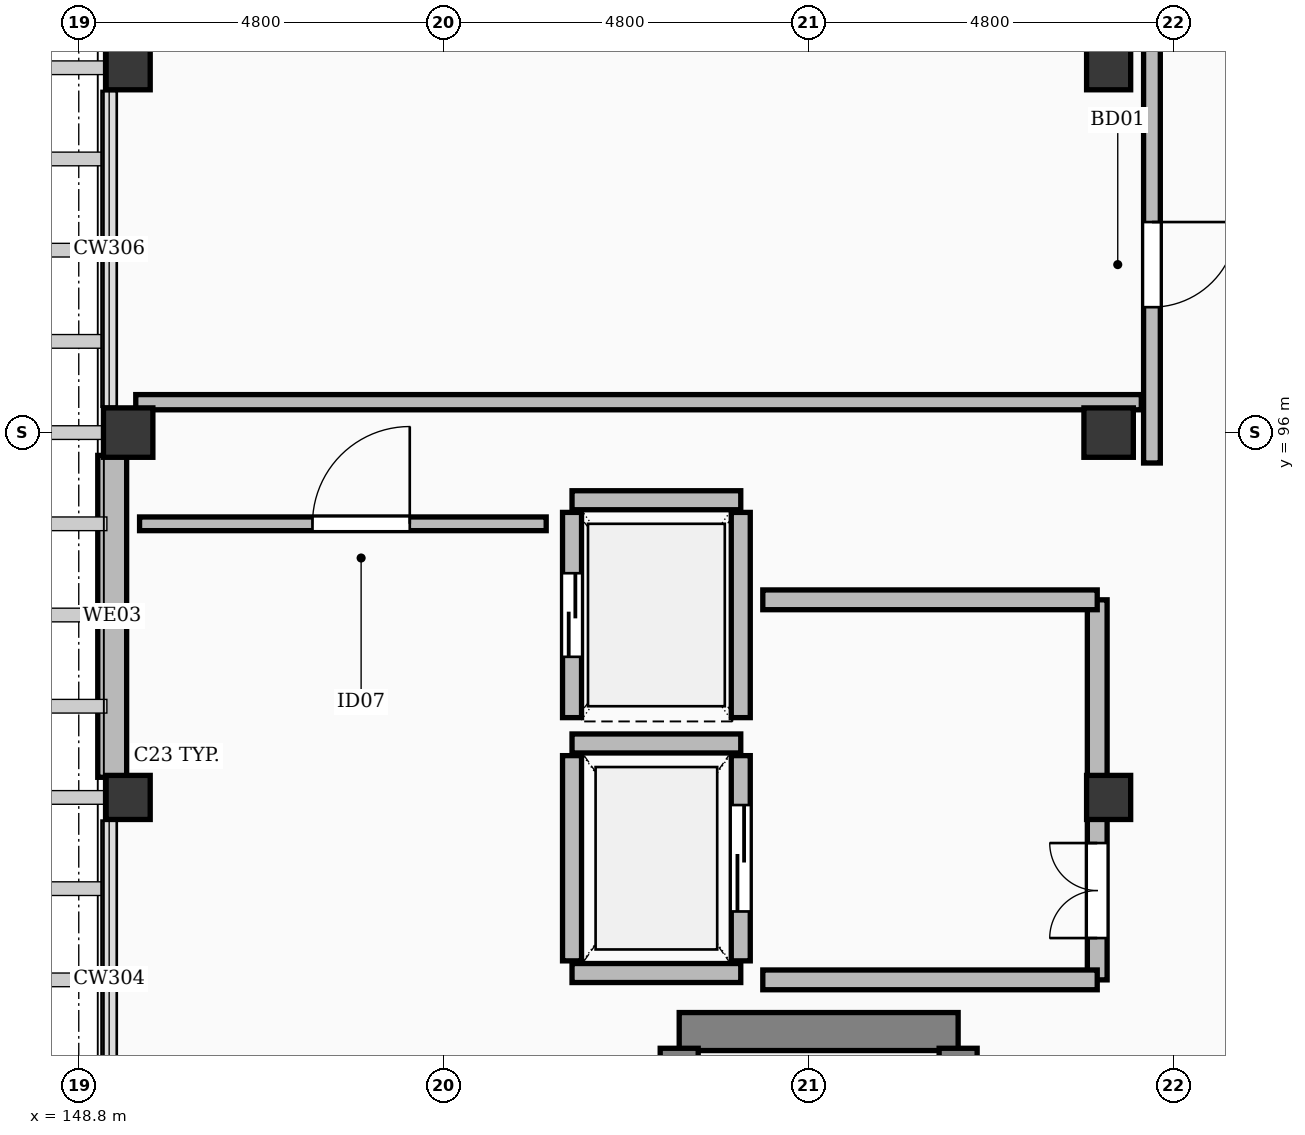
"""IFC4 building model, lengths in metres.
Left out: names, types, materials, properties, quantities, classifications, styles, units other than length and angle.
Written with IfcOpenShell. Run it as: python <this file> out.ifc"""

import sys

from ifc_helpers import new_model, si_unit, direction, frame, frame_2d, origin, origin_2d, place, context, subcontext, project, spatial, rectangle, extrude, element, fill, save


model = new_model("IFC4")
c1 = context("Model", 3, precision=1e-05, world=origin(), true_north=direction((0.0, 1.0)))
c2 = subcontext(c1, "Body", "Model", "MODEL_VIEW")
j1 = project(units=[si_unit("LENGTHUNIT", "METRE"), si_unit("PLANEANGLEUNIT", "RADIAN")], contexts=[c1])
p1 = place(None, origin())
s1 = spatial("IfcSite", under=j1, at=p1, CompositionType="ELEMENT")
p2 = place(p1, origin())
s2 = spatial("IfcBuilding", under=s1, at=p2, CompositionType="ELEMENT")
p3 = place(p2, frame((0.0, 0.0, 39.0)))
s3 = spatial("IfcBuildingStorey", under=s2, at=p3, CompositionType="ELEMENT", Elevation=39.0)
for number, where, z_axis, x_axis in (
    (1, (149.45, 96.0, 0.0), (0.0, 0.0, 1.0), (1.0, 0.0, 0.0)),
    (2, (162.35, 96.0, 0.0), (0.0, 0.0, 1.0), (1.0, 0.0, 0.0)),
):
    element("IfcColumn", number, at=place(p3, frame(where, z_axis=z_axis, x_axis=x_axis)), inside=s3, PredefinedType="COLUMN", context=c2, shape_type="SweptSolid", body=[
        extrude(rectangle(XDim=0.65, YDim=0.65, at=origin_2d()), origin(), (0.0, 0.0, 1.0), 3.6),
    ])
for number, where, z_axis, x_axis in (
    (3, (149.45, 91.2, 0.0), (0.0, 0.0, 1.0), (1.0, 0.0, 0.0)),
    (4, (149.45, 100.8, 0.0), (0.0, 0.0, 1.0), (1.0, 0.0, 0.0)),
    (5, (162.35, 91.2, 0.0), (0.0, 0.0, 1.0), (1.0, 0.0, 0.0)),
    (6, (162.35, 100.8, 0.0), (0.0, 0.0, 1.0), (1.0, 0.0, 0.0)),
):
    element("IfcColumn", number, at=place(p3, frame(where, z_axis=z_axis, x_axis=x_axis)), inside=s3, PredefinedType="COLUMN", context=c2, shape_type="SweptSolid", body=[
        extrude(rectangle(XDim=0.58, YDim=0.58, at=origin_2d()), origin(), (0.0, 0.0, 1.0), 3.6),
    ])
p4 = place(p3, frame((149.24, 91.465, 0.0), z_axis=(0.0, 0.0, 1.0), x_axis=(0.0, 1.0, 0.0)))
e7 = element("IfcWall", 7, at=p4, inside=s3, PredefinedType="SOLIDWALL", context=c2, shape_type="SweptSolid", body=[
    extrude(rectangle(XDim=4.235, YDim=0.38, at=frame_2d((2.117, 0.0))), origin(), (0.0, 0.0, 1.0), 2.772),
])
p5 = place(p3, frame((156.7, 88.12, 0.0), z_axis=(0.0, 0.0, 1.0), x_axis=(1.0, 0.0, 0.0)))
e8 = element("IfcWall", 8, at=p5, inside=s3, PredefinedType="SHEAR", context=c2, shape_type="SweptSolid", body=[
    extrude(rectangle(XDim=3.67, YDim=0.5, at=frame_2d((1.835, 0.0))), origin(), (0.0, 0.0, 1.0), 3.36),
])
p6 = place(p3, frame((156.7, 77.4, 0.0), z_axis=(0.0, 0.0, 1.0), x_axis=(0.0, 1.0, 0.0)))
e9 = element("IfcWall", 9, at=p6, inside=s3, PredefinedType="SHEAR", context=c2, shape_type="SweptSolid", body=[
    extrude(rectangle(XDim=10.5, YDim=0.5, at=frame_2d((5.25, 0.0))), origin(), (0.0, 0.0, 1.0), 3.36),
])
p7 = place(p3, frame((160.37, 77.4, 0.0), z_axis=(0.0, 0.0, 1.0), x_axis=(0.0, 1.0, 0.0)))
e10 = element("IfcWall", 10, at=p7, inside=s3, PredefinedType="SHEAR", context=c2, shape_type="SweptSolid", body=[
    extrude(rectangle(XDim=10.5, YDim=0.5, at=frame_2d((5.25, 0.0))), origin(), (0.0, 0.0, 1.0), 3.36),
])
p8 = place(p7, frame((0.45, 0.0, 0.0)))
e11 = element("IfcOpeningElement", 11, at=p8, cuts=e10, PredefinedType="OPENING", context=c2, shape_type="SweptSolid", body=[
    extrude(rectangle(XDim=1.3, YDim=2.15, at=frame_2d((0.65, 1.075))), frame((0.0, 0.262, 0.0), z_axis=(0.0, -1.0, 0.0), x_axis=(1.0, 0.0, 0.0)), (0.0, 0.0, 1.0), 0.524),
])
for number, where, z_axis, x_axis in (
    (12, (155.29, 88.89, 0.0), (0.0, 0.0, 1.0), (1.0, 0.0, 0.0)),
    (13, (155.29, 91.91, 0.0), (0.0, 0.0, 1.0), (1.0, 0.0, 0.0)),
):
    element("IfcWall", number, at=place(p3, frame(where, z_axis=z_axis, x_axis=x_axis)), inside=s3, PredefinedType="SOLIDWALL", context=c2, shape_type="SweptSolid", body=[
        extrude(rectangle(XDim=2.22, YDim=0.25, at=frame_2d((1.11, 0.0))), origin(), (0.0, 0.0, 1.0), 3.36),
    ])
p9 = place(p3, frame((155.29, 89.05, 0.0), z_axis=(0.0, 0.0, 1.0), x_axis=(0.0, 1.0, 0.0)))
e14 = element("IfcWall", 14, at=p9, inside=s3, PredefinedType="SOLIDWALL", context=c2, shape_type="SweptSolid", body=[
    extrude(rectangle(XDim=2.7, YDim=0.25, at=frame_2d((1.35, 0.0))), origin(), (0.0, 0.0, 1.0), 2.772),
])
p10 = place(p3, frame((157.51, 89.05, 0.0), z_axis=(0.0, 0.0, 1.0), x_axis=(0.0, 1.0, 0.0)))
e15 = element("IfcWall", 15, at=p10, inside=s3, PredefinedType="SOLIDWALL", context=c2, shape_type="SweptSolid", body=[
    extrude(rectangle(XDim=2.7, YDim=0.25, at=frame_2d((1.35, 0.0))), origin(), (0.0, 0.0, 1.0), 2.772),
])
p11 = place(p10, frame((0.65, 0.0, 0.0)))
e16 = element("IfcOpeningElement", 16, at=p11, cuts=e15, PredefinedType="OPENING", context=c2, shape_type="SweptSolid", body=[
    extrude(rectangle(XDim=1.4, YDim=2.3, at=frame_2d((0.7, 1.15))), frame((0.0, 0.137, 0.0), z_axis=(0.0, -1.0, 0.0), x_axis=(1.0, 0.0, 0.0)), (0.0, 0.0, 1.0), 0.274),
])
p12 = place(p3, frame((155.29, 95.11, 0.0), z_axis=(0.0, 0.0, 1.0), x_axis=(1.0, 0.0, 0.0)))
e17 = element("IfcWall", 17, at=p12, inside=s3, PredefinedType="SOLIDWALL", context=c2, shape_type="SweptSolid", body=[
    extrude(rectangle(XDim=2.22, YDim=0.25, at=frame_2d((1.11, 0.0))), origin(), (0.0, 0.0, 1.0), 3.36),
])
p13 = place(p3, frame((155.29, 92.25, 0.0), z_axis=(0.0, 0.0, 1.0), x_axis=(0.0, 1.0, 0.0)))
e18 = element("IfcWall", 18, at=p13, inside=s3, PredefinedType="SOLIDWALL", context=c2, shape_type="SweptSolid", body=[
    extrude(rectangle(XDim=2.7, YDim=0.25, at=frame_2d((1.35, 0.0))), origin(), (0.0, 0.0, 1.0), 3.36),
])
p14 = place(p13, frame((0.8, 0.0, 0.0)))
e19 = element("IfcOpeningElement", 19, at=p14, cuts=e18, PredefinedType="OPENING", context=c2, shape_type="SweptSolid", body=[
    extrude(rectangle(XDim=1.1, YDim=2.2, at=frame_2d((0.55, 1.1))), frame((0.0, 0.137, 0.0), z_axis=(0.0, -1.0, 0.0), x_axis=(1.0, 0.0, 0.0)), (0.0, 0.0, 1.0), 0.274),
])
p15 = place(p3, frame((157.51, 92.25, 0.0), z_axis=(0.0, 0.0, 1.0), x_axis=(0.0, 1.0, 0.0)))
e20 = element("IfcWall", 20, at=p15, inside=s3, PredefinedType="SOLIDWALL", context=c2, shape_type="SweptSolid", body=[
    extrude(rectangle(XDim=2.7, YDim=0.25, at=frame_2d((1.35, 0.0))), origin(), (0.0, 0.0, 1.0), 3.36),
])
p16 = place(p3, frame((162.2, 88.8, 0.0), z_axis=(0.0, 0.0, 1.0), x_axis=(0.0, 1.0, 0.0)))
e21 = element("IfcWall", 21, at=p16, inside=s3, PredefinedType="SOLIDWALL", context=c2, shape_type="SweptSolid", body=[
    extrude(rectangle(XDim=5.0, YDim=0.26, at=frame_2d((2.5, 0.0))), origin(), (0.0, 0.0, 1.0), 2.772),
])
p17 = place(p16, frame((0.55, 0.0, 0.0)))
e22 = element("IfcOpeningElement", 22, at=p17, cuts=e21, PredefinedType="OPENING", context=c2, shape_type="SweptSolid", body=[
    extrude(rectangle(XDim=1.25, YDim=2.15, at=frame_2d((0.625, 1.075))), frame((0.0, 0.142, 0.0), z_axis=(0.0, -1.0, 0.0), x_axis=(1.0, 0.0, 0.0)), (0.0, 0.0, 1.0), 0.284),
])
for number, where, z_axis, x_axis in (
    (23, (157.8, 88.8, 0.0), (0.0, 0.0, 1.0), (1.0, 0.0, 0.0)),
    (24, (157.8, 93.8, 0.0), (0.0, 0.0, 1.0), (1.0, 0.0, 0.0)),
):
    element("IfcWall", number, at=place(p3, frame(where, z_axis=z_axis, x_axis=x_axis)), inside=s3, PredefinedType="SOLIDWALL", context=c2, shape_type="SweptSolid", body=[
        extrude(rectangle(XDim=4.4, YDim=0.26, at=frame_2d((2.2, 0.0))), origin(), (0.0, 0.0, 1.0), 2.772),
    ])
p18 = place(p3, frame((162.92, 95.6, 0.0), z_axis=(0.0, 0.0, 1.0), x_axis=(0.0, 1.0, 0.0)))
e25 = element("IfcWall", 25, at=p18, inside=s3, PredefinedType="PARTITIONING", context=c2, shape_type="SweptSolid", body=[
    extrude(rectangle(XDim=7.22, YDim=0.22, at=frame_2d((3.61, 0.0))), origin(), (0.0, 0.0, 1.0), 2.772),
])
p19 = place(p18, frame((2.05, 0.0, 0.0)))
e26 = element("IfcOpeningElement", 26, at=p19, cuts=e25, PredefinedType="OPENING", context=c2, shape_type="SweptSolid", body=[
    extrude(rectangle(XDim=1.12, YDim=2.15, at=frame_2d((0.56, 1.075))), frame((0.0, 0.122, 0.0), z_axis=(0.0, -1.0, 0.0), x_axis=(1.0, 0.0, 0.0)), (0.0, 0.0, 1.0), 0.244),
])
p20 = place(p18, frame((5.8, 0.0, 0.0)))
e27 = element("IfcOpeningElement", 27, at=p20, cuts=e25, PredefinedType="OPENING", context=c2, shape_type="SweptSolid", body=[
    extrude(rectangle(XDim=1.02, YDim=2.2, at=frame_2d((0.51, 1.1))), frame((0.0, 0.122, 0.0), z_axis=(0.0, -1.0, 0.0), x_axis=(1.0, 0.0, 0.0)), (0.0, 0.0, 1.0), 0.244),
])
p21 = place(p3, frame((149.55, 96.4, 0.0), z_axis=(0.0, 0.0, 1.0), x_axis=(1.0, 0.0, 0.0)))
e28 = element("IfcWall", 28, at=p21, inside=s3, PredefinedType="PARTITIONING", context=c2, shape_type="SweptSolid", body=[
    extrude(rectangle(XDim=13.23, YDim=0.2, at=frame_2d((6.615, 0.0))), origin(), (0.0, 0.0, 1.0), 2.772),
])
p22 = place(p3, frame((149.6, 94.8, 0.0), z_axis=(0.0, 0.0, 1.0), x_axis=(1.0, 0.0, 0.0)))
e29 = element("IfcWall", 29, at=p22, inside=s3, PredefinedType="PARTITIONING", context=c2, shape_type="SweptSolid", body=[
    extrude(rectangle(XDim=5.35, YDim=0.18, at=frame_2d((2.675, 0.0))), origin(), (0.0, 0.0, 1.0), 2.772),
])
p23 = place(p22, frame((2.275, 0.0, 0.0)))
e30 = element("IfcOpeningElement", 30, at=p23, cuts=e29, PredefinedType="OPENING", context=c2, shape_type="SweptSolid", body=[
    extrude(rectangle(XDim=1.28, YDim=2.16, at=frame_2d((0.64, 1.08))), frame((0.0, 0.102, 0.0), z_axis=(0.0, -1.0, 0.0), x_axis=(1.0, 0.0, 0.0)), (0.0, 0.0, 1.0), 0.204),
])
p24 = place(p11, origin())
e31 = element("IfcDoor", 31, at=p24, inside=s3, OperationType="SLIDING_TO_LEFT", PredefinedType="DOOR", context=c2, shape_type="SweptSolid", body=[
    extrude(rectangle(XDim=1.4, YDim=2.3, at=frame_2d((0.7, 1.15))), frame((0.0, 0.025, 0.0), z_axis=(0.0, -1.0, 0.0), x_axis=(1.0, 0.0, 0.0)), (0.0, 0.0, 1.0), 0.05),
])
fill(e16, e31)
p25 = place(p14, origin())
e32 = element("IfcDoor", 32, at=p25, inside=s3, OperationType="SLIDING_TO_LEFT", PredefinedType="DOOR", context=c2, shape_type="SweptSolid", body=[
    extrude(rectangle(XDim=1.1, YDim=2.2, at=frame_2d((0.55, 1.1))), frame((0.0, 0.025, 0.0), z_axis=(0.0, -1.0, 0.0), x_axis=(1.0, 0.0, 0.0)), (0.0, 0.0, 1.0), 0.05),
])
fill(e19, e32)
p26 = place(p17, origin())
e33 = element("IfcDoor", 33, at=p26, inside=s3, OperationType="DOUBLE_DOOR_SINGLE_SWING", PredefinedType="DOOR", context=c2, shape_type="SweptSolid", body=[
    extrude(rectangle(XDim=1.25, YDim=2.15, at=frame_2d((0.625, 1.075))), frame((0.0, 0.025, 0.0), z_axis=(0.0, -1.0, 0.0), x_axis=(1.0, 0.0, 0.0)), (0.0, 0.0, 1.0), 0.05),
])
fill(e22, e33)
p27 = place(p19, frame((1.12, 0.0, 0.0), z_axis=(0.0, 0.0, 1.0), x_axis=(-1.0, 0.0, 0.0)))
e34 = element("IfcDoor", 34, at=p27, inside=s3, OperationType="SINGLE_SWING_RIGHT", PredefinedType="DOOR", context=c2, shape_type="SweptSolid", body=[
    extrude(rectangle(XDim=1.12, YDim=2.15, at=frame_2d((0.56, 1.075))), frame((0.0, 0.025, 0.0), z_axis=(0.0, -1.0, 0.0), x_axis=(1.0, 0.0, 0.0)), (0.0, 0.0, 1.0), 0.05),
])
fill(e26, e34)
p28 = place(p23, origin())
e35 = element("IfcDoor", 35, at=p28, inside=s3, OperationType="SINGLE_SWING_RIGHT", PredefinedType="DOOR", context=c2, shape_type="SweptSolid", body=[
    extrude(rectangle(XDim=1.28, YDim=2.16, at=frame_2d((0.64, 1.08))), frame((0.0, 0.025, 0.0), z_axis=(0.0, -1.0, 0.0), x_axis=(1.0, 0.0, 0.0)), (0.0, 0.0, 1.0), 0.05),
])
fill(e30, e35)
save(model, sys.argv[1])
